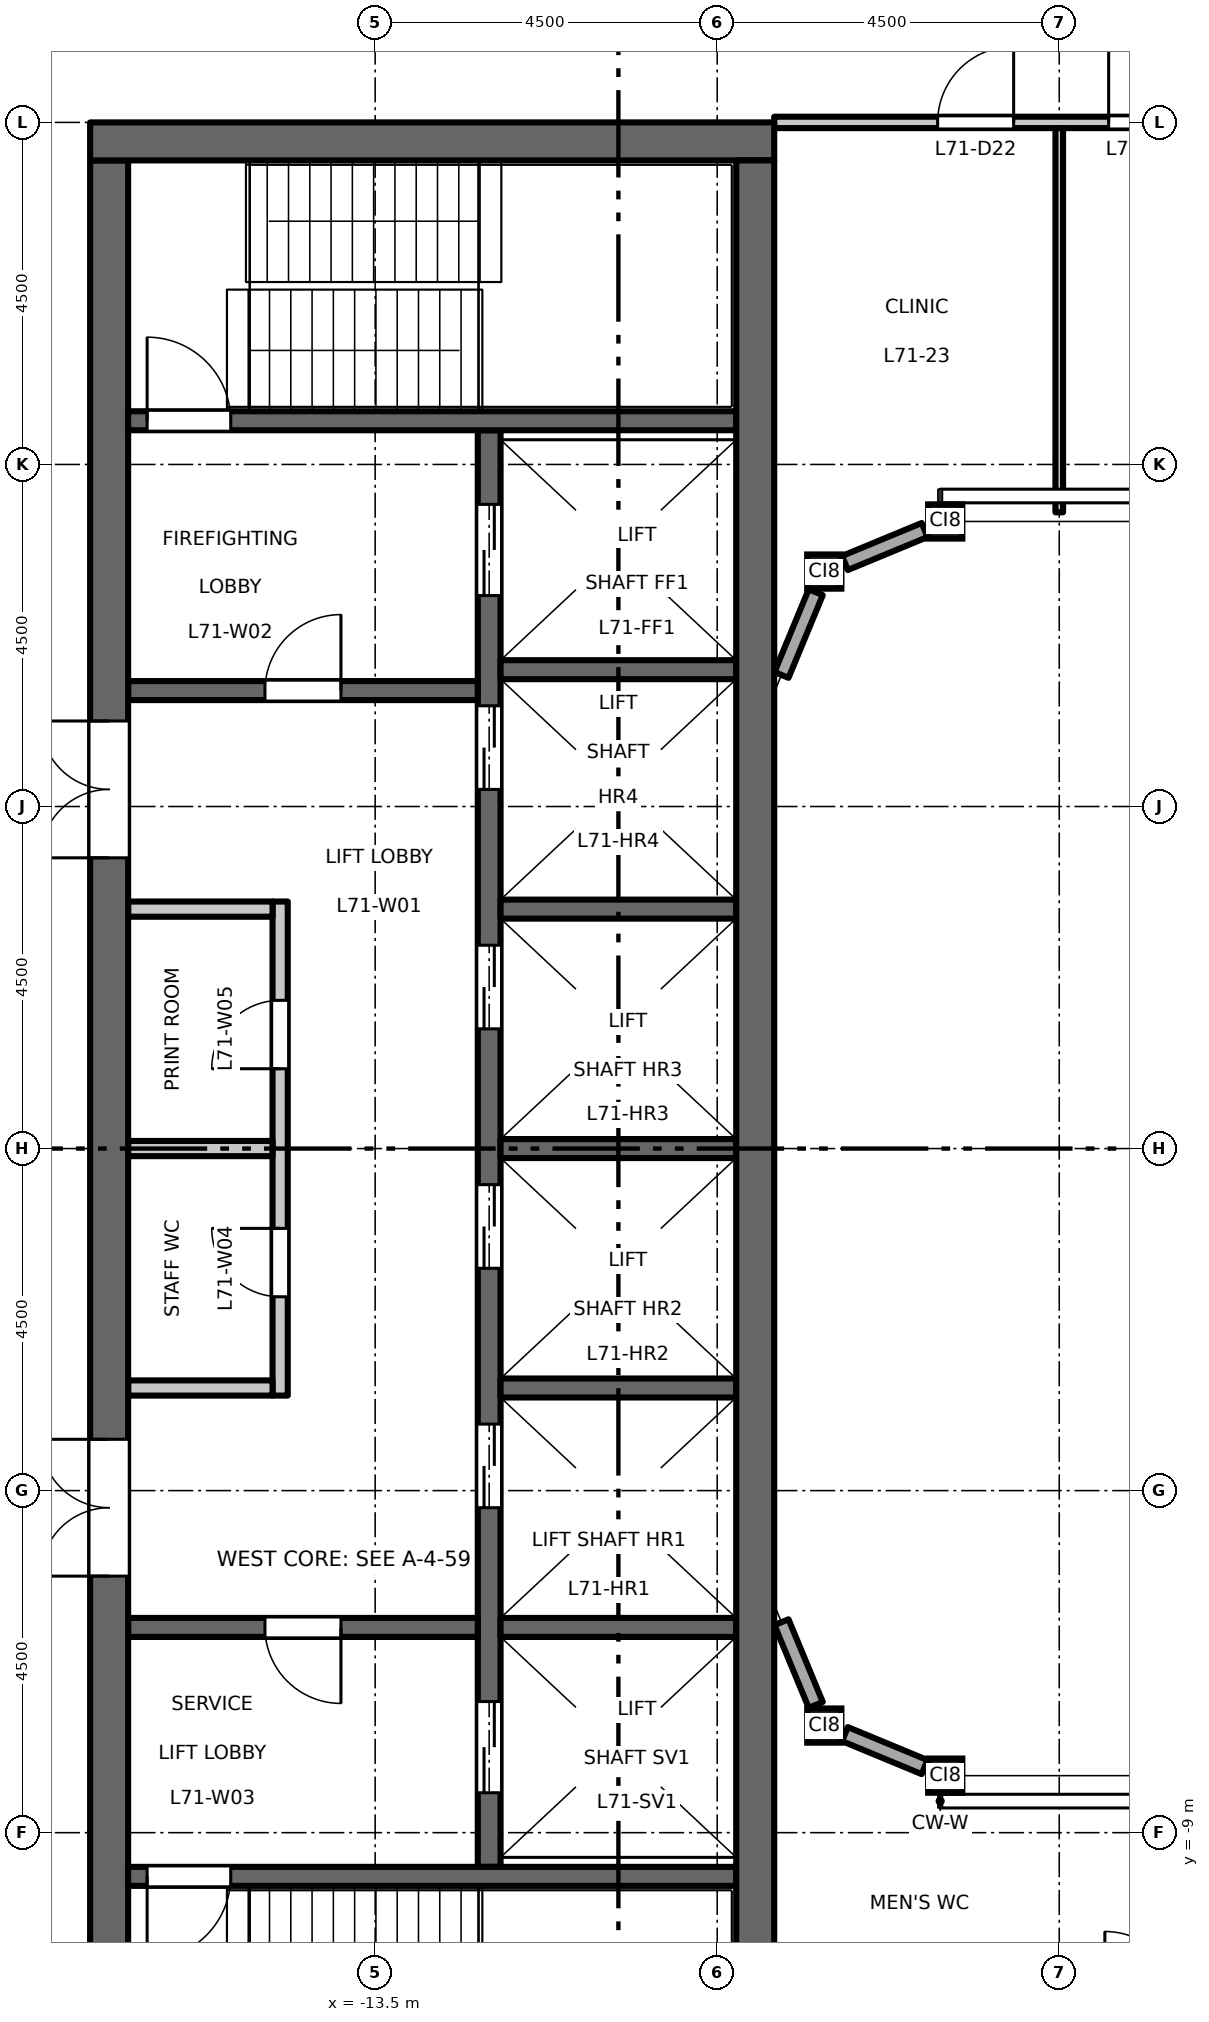
"""IFC4 building model, lengths in metres.
Left out: names, types, materials, properties, quantities, classifications, styles, units other than length and angle.
Written with IfcOpenShell. Run it as: python <this file> out.ifc"""

import sys

from ifc_helpers import new_model, si_unit, direction, frame, frame_2d, origin, origin_2d, place, context, subcontext, project, spatial, rectangle, hollow_rectangle, extrude, element, fill, save


model = new_model("IFC4")
c1 = context("Model", 3, precision=1e-05, world=origin(), true_north=direction((0.0, 1.0)))
c2 = subcontext(c1, "Body", "Model", "MODEL_VIEW")
j1 = project(units=[si_unit("LENGTHUNIT", "METRE"), si_unit("PLANEANGLEUNIT", "RADIAN")], contexts=[c1])
p1 = place(None, origin())
s1 = spatial("IfcSite", under=j1, at=p1, CompositionType="ELEMENT")
p2 = place(p1, origin())
s2 = spatial("IfcBuilding", under=s1, at=p2, CompositionType="ELEMENT")
p3 = place(p2, frame((0.0, 0.0, 330.2)))
s3 = spatial("IfcBuildingStorey", under=s2, at=p3, CompositionType="ELEMENT", Elevation=330.2)
for number, where, z_axis, x_axis in (
    (1, (-7.591, -7.591, 0.0), (0.0, 0.0, 1.0), (1.0, 0.0, 0.0)),
    (2, (-6.0, -8.25, 0.0), (0.0, 0.0, 1.0), (1.0, 0.0, 0.0)),
    (3, (-7.591, 7.591, 0.0), (0.0, 0.0, 1.0), (1.0, 0.0, 0.0)),
    (4, (-6.0, 8.25, 0.0), (0.0, 0.0, 1.0), (1.0, 0.0, 0.0)),
):
    element("IfcColumn", number, at=place(p3, frame(where, z_axis=z_axis, x_axis=x_axis)), inside=s3, PredefinedType="COLUMN", context=c2, shape_type="SweptSolid", body=[
        extrude(hollow_rectangle(XDim=0.45, YDim=0.45, WallThickness=0.022, at=origin_2d()), origin(), (0.0, 0.0, 1.0), 4.5),
    ])
p4 = place(p3, frame((-14.75, -3.25, 0.0), z_axis=(0.0, 0.0, 1.0), x_axis=(0.0, 1.0, 0.0)))
e5 = element("IfcWall", 5, at=p4, inside=s3, PredefinedType="PARTITIONING", context=c2, shape_type="SweptSolid", body=[
    extrude(rectangle(XDim=6.5, YDim=0.2, at=frame_2d((3.25, 0.0))), origin(), (0.0, 0.0, 1.0), 4.35),
])
p5 = place(p4, frame((1.3, 0.0, 0.0)))
e6 = element("IfcOpeningElement", 6, at=p5, cuts=e5, PredefinedType="OPENING", context=c2, shape_type="SweptSolid", body=[
    extrude(rectangle(XDim=0.9, YDim=2.1, at=frame_2d((0.45, 1.05))), frame((0.0, 0.11, 0.0), z_axis=(0.0, -1.0, 0.0), x_axis=(1.0, 0.0, 0.0)), (0.0, 0.0, 1.0), 0.22),
])
p6 = place(p4, frame((4.3, 0.0, 0.0)))
e7 = element("IfcOpeningElement", 7, at=p6, cuts=e5, PredefinedType="OPENING", context=c2, shape_type="SweptSolid", body=[
    extrude(rectangle(XDim=0.9, YDim=2.1, at=frame_2d((0.45, 1.05))), frame((0.0, 0.11, 0.0), z_axis=(0.0, -1.0, 0.0), x_axis=(1.0, 0.0, 0.0)), (0.0, 0.0, 1.0), 0.22),
])
for number, where, z_axis, x_axis in (
    (8, (-14.85, 3.15, 0.0), (0.0, 0.0, 1.0), (-1.0, 0.0, 0.0)),
    (9, (-14.85, -3.15, 0.0), (0.0, 0.0, 1.0), (-1.0, 0.0, 0.0)),
    (10, (-14.85, 0.0, 0.0), (0.0, 0.0, 1.0), (-1.0, 0.0, 0.0)),
):
    element("IfcWall", number, at=place(p3, frame(where, z_axis=z_axis, x_axis=x_axis)), inside=s3, PredefinedType="PARTITIONING", context=c2, shape_type="SweptSolid", body=[
        extrude(rectangle(XDim=1.9, YDim=0.2, at=frame_2d((0.95, 0.0))), origin(), (0.0, 0.0, 1.0), 4.35),
    ])
p7 = place(p3, frame((-12.0, -9.45, 0.0), z_axis=(0.0, 0.0, 1.0), x_axis=(0.0, 1.0, 0.0)))
e11 = element("IfcWall", 11, at=p7, inside=s3, PredefinedType="SHEAR", context=c2, shape_type="SweptSolid", body=[
    extrude(rectangle(XDim=18.9, YDim=0.3, at=frame_2d((9.45, 0.0))), origin(), (0.0, 0.0, 1.0), 4.35),
])
p8 = place(p7, frame((4.725, 0.0, 0.0)))
e12 = element("IfcOpeningElement", 12, at=p8, cuts=e11, PredefinedType="OPENING", context=c2, shape_type="SweptSolid", body=[
    extrude(rectangle(XDim=1.1, YDim=2.1, at=frame_2d((0.55, 1.05))), frame((0.0, 0.16, 0.0), z_axis=(0.0, -1.0, 0.0), x_axis=(1.0, 0.0, 0.0)), (0.0, 0.0, 1.0), 0.32),
])
p9 = place(p7, frame((7.875, 0.0, 0.0)))
e13 = element("IfcOpeningElement", 13, at=p9, cuts=e11, PredefinedType="OPENING", context=c2, shape_type="SweptSolid", body=[
    extrude(rectangle(XDim=1.1, YDim=2.1, at=frame_2d((0.55, 1.05))), frame((0.0, 0.16, 0.0), z_axis=(0.0, -1.0, 0.0), x_axis=(1.0, 0.0, 0.0)), (0.0, 0.0, 1.0), 0.32),
])
p10 = place(p7, frame((11.025, 0.0, 0.0)))
e14 = element("IfcOpeningElement", 14, at=p10, cuts=e11, PredefinedType="OPENING", context=c2, shape_type="SweptSolid", body=[
    extrude(rectangle(XDim=1.1, YDim=2.1, at=frame_2d((0.55, 1.05))), frame((0.0, 0.16, 0.0), z_axis=(0.0, -1.0, 0.0), x_axis=(1.0, 0.0, 0.0)), (0.0, 0.0, 1.0), 0.32),
])
p11 = place(p7, frame((14.175, 0.0, 0.0)))
e15 = element("IfcOpeningElement", 15, at=p11, cuts=e11, PredefinedType="OPENING", context=c2, shape_type="SweptSolid", body=[
    extrude(rectangle(XDim=1.1, YDim=2.1, at=frame_2d((0.55, 1.05))), frame((0.0, 0.16, 0.0), z_axis=(0.0, -1.0, 0.0), x_axis=(1.0, 0.0, 0.0)), (0.0, 0.0, 1.0), 0.32),
])
p12 = place(p7, frame((16.725, 0.0, 0.0)))
e16 = element("IfcOpeningElement", 16, at=p12, cuts=e11, PredefinedType="OPENING", context=c2, shape_type="SweptSolid", body=[
    extrude(rectangle(XDim=1.2, YDim=2.1, at=frame_2d((0.6, 1.05))), frame((0.0, 0.16, 0.0), z_axis=(0.0, -1.0, 0.0), x_axis=(1.0, 0.0, 0.0)), (0.0, 0.0, 1.0), 0.32),
])
p13 = place(p7, frame((0.975, 0.0, 0.0)))
e17 = element("IfcOpeningElement", 17, at=p13, cuts=e11, PredefinedType="OPENING", context=c2, shape_type="SweptSolid", body=[
    extrude(rectangle(XDim=1.2, YDim=2.1, at=frame_2d((0.6, 1.05))), frame((0.0, 0.16, 0.0), z_axis=(0.0, -1.0, 0.0), x_axis=(1.0, 0.0, 0.0)), (0.0, 0.0, 1.0), 0.32),
])
p14 = place(p3, frame((-12.15, 6.025, 0.0), z_axis=(0.0, 0.0, 1.0), x_axis=(-1.0, 0.0, 0.0)))
e18 = element("IfcWall", 18, at=p14, inside=s3, PredefinedType="SHEAR", context=c2, shape_type="SweptSolid", body=[
    extrude(rectangle(XDim=4.6, YDim=0.25, at=frame_2d((2.3, 0.0))), origin(), (0.0, 0.0, 1.0), 4.35),
])
p15 = place(p14, frame((1.8, 0.0, 0.0)))
e19 = element("IfcOpeningElement", 19, at=p15, cuts=e18, PredefinedType="OPENING", context=c2, shape_type="SweptSolid", body=[
    extrude(rectangle(XDim=1.0, YDim=2.1, at=frame_2d((0.5, 1.05))), frame((0.0, 0.135, 0.0), z_axis=(0.0, -1.0, 0.0), x_axis=(1.0, 0.0, 0.0)), (0.0, 0.0, 1.0), 0.27),
])
p16 = place(p3, frame((-12.15, -6.3, 0.0), z_axis=(0.0, 0.0, 1.0), x_axis=(-1.0, 0.0, 0.0)))
e20 = element("IfcWall", 20, at=p16, inside=s3, PredefinedType="SHEAR", context=c2, shape_type="SweptSolid", body=[
    extrude(rectangle(XDim=4.6, YDim=0.25, at=frame_2d((2.3, 0.0))), origin(), (0.0, 0.0, 1.0), 4.35),
])
p17 = place(p16, frame((1.8, 0.0, 0.0)))
e21 = element("IfcOpeningElement", 21, at=p17, cuts=e20, PredefinedType="OPENING", context=c2, shape_type="SweptSolid", body=[
    extrude(rectangle(XDim=1.0, YDim=2.1, at=frame_2d((0.5, 1.05))), frame((0.0, 0.135, 0.0), z_axis=(0.0, -1.0, 0.0), x_axis=(1.0, 0.0, 0.0)), (0.0, 0.0, 1.0), 0.27),
])
p18 = place(p3, frame((-17.0, -13.0, 0.0), z_axis=(0.0, 0.0, 1.0), x_axis=(0.0, 1.0, 0.0)))
e22 = element("IfcWall", 22, at=p18, inside=s3, PredefinedType="SHEAR", context=c2, shape_type="SweptSolid", body=[
    extrude(rectangle(XDim=26.0, YDim=0.5, at=frame_2d((13.0, 0.0))), origin(), (0.0, 0.0, 1.0), 4.35),
])
p19 = place(p18, frame((16.825, 0.0, 0.0)))
e23 = element("IfcOpeningElement", 23, at=p19, cuts=e22, PredefinedType="OPENING", context=c2, shape_type="SweptSolid", body=[
    extrude(rectangle(XDim=1.8, YDim=2.1, at=frame_2d((0.9, 1.05))), frame((0.0, 0.26, 0.0), z_axis=(0.0, -1.0, 0.0), x_axis=(1.0, 0.0, 0.0)), (0.0, 0.0, 1.0), 0.52),
])
p20 = place(p18, frame((7.375, 0.0, 0.0)))
e24 = element("IfcOpeningElement", 24, at=p20, cuts=e22, PredefinedType="OPENING", context=c2, shape_type="SweptSolid", body=[
    extrude(rectangle(XDim=1.8, YDim=2.1, at=frame_2d((0.9, 1.05))), frame((0.0, 0.26, 0.0), z_axis=(0.0, -1.0, 0.0), x_axis=(1.0, 0.0, 0.0)), (0.0, 0.0, 1.0), 0.52),
])
for number, where, z_axis, x_axis in (
    (25, (-8.75, 0.0, 0.0), (0.0, 0.0, 1.0), (-1.0, 0.0, 0.0)),
    (26, (-8.75, 3.15, 0.0), (0.0, 0.0, 1.0), (-1.0, 0.0, 0.0)),
    (27, (-8.75, 6.3, 0.0), (0.0, 0.0, 1.0), (-1.0, 0.0, 0.0)),
    (28, (-8.75, -3.15, 0.0), (0.0, 0.0, 1.0), (-1.0, 0.0, 0.0)),
    (29, (-8.75, -6.3, 0.0), (0.0, 0.0, 1.0), (-1.0, 0.0, 0.0)),
):
    element("IfcWall", number, at=place(p3, frame(where, z_axis=z_axis, x_axis=x_axis)), inside=s3, PredefinedType="SHEAR", context=c2, shape_type="SweptSolid", body=[
        extrude(rectangle(XDim=3.1, YDim=0.25, at=frame_2d((1.55, 0.0))), origin(), (0.0, 0.0, 1.0), 4.35),
    ])
p21 = place(p3, frame((-8.75, 9.575, 0.0), z_axis=(0.0, 0.0, 1.0), x_axis=(-1.0, 0.0, 0.0)))
e30 = element("IfcWall", 30, at=p21, inside=s3, PredefinedType="SHEAR", context=c2, shape_type="SweptSolid", body=[
    extrude(rectangle(XDim=8.0, YDim=0.25, at=frame_2d((4.0, 0.0))), origin(), (0.0, 0.0, 1.0), 4.35),
])
p22 = place(p21, frame((6.65, 0.0, 0.0)))
e31 = element("IfcOpeningElement", 31, at=p22, cuts=e30, PredefinedType="OPENING", context=c2, shape_type="SweptSolid", body=[
    extrude(rectangle(XDim=1.1, YDim=2.1, at=frame_2d((0.55, 1.05))), frame((0.0, 0.135, 0.0), z_axis=(0.0, -1.0, 0.0), x_axis=(1.0, 0.0, 0.0)), (0.0, 0.0, 1.0), 0.27),
])
p23 = place(p3, frame((-8.75, -9.575, 0.0), z_axis=(0.0, 0.0, 1.0), x_axis=(-1.0, 0.0, 0.0)))
e32 = element("IfcWall", 32, at=p23, inside=s3, PredefinedType="SHEAR", context=c2, shape_type="SweptSolid", body=[
    extrude(rectangle(XDim=8.0, YDim=0.25, at=frame_2d((4.0, 0.0))), origin(), (0.0, 0.0, 1.0), 4.35),
])
p24 = place(p23, frame((6.65, 0.0, 0.0)))
e33 = element("IfcOpeningElement", 33, at=p24, cuts=e32, PredefinedType="OPENING", context=c2, shape_type="SweptSolid", body=[
    extrude(rectangle(XDim=1.1, YDim=2.1, at=frame_2d((0.55, 1.05))), frame((0.0, 0.135, 0.0), z_axis=(0.0, -1.0, 0.0), x_axis=(1.0, 0.0, 0.0)), (0.0, 0.0, 1.0), 0.27),
])
p25 = place(p3, frame((-8.25, 13.25, 0.0), z_axis=(0.0, 0.0, 1.0), x_axis=(-1.0, 0.0, 0.0)))
e34 = element("IfcWall", 34, at=p25, inside=s3, PredefinedType="SHEAR", context=c2, shape_type="SweptSolid", body=[
    extrude(rectangle(XDim=9.0, YDim=0.5, at=frame_2d((4.5, 0.0))), origin(), (0.0, 0.0, 1.0), 4.35),
])
p26 = place(p3, frame((-8.5, -13.0, 0.0), z_axis=(0.0, 0.0, 1.0), x_axis=(0.0, 1.0, 0.0)))
e35 = element("IfcWall", 35, at=p26, inside=s3, PredefinedType="SHEAR", context=c2, shape_type="SweptSolid", body=[
    extrude(rectangle(XDim=26.0, YDim=0.5, at=frame_2d((13.0, 0.0))), origin(), (0.0, 0.0, 1.0), 4.35),
])
p27 = place(p3, frame((-6.271, 8.137, 0.0), z_axis=(0.0, 0.0, 1.0), x_axis=(-0.923864661962, -0.382719331074, 0.0)))
e36 = element("IfcWall", 36, at=p27, inside=s3, PredefinedType="STANDARD", context=c2, shape_type="SweptSolid", body=[
    extrude(rectangle(XDim=1.134, YDim=0.2, at=frame_2d((0.567, 0.0))), origin(), (0.0, 0.0, 1.0), 4.01),
])
for number, where, z_axis, x_axis in (
    (37, (-7.703, 7.319, 0.0), (0.0, 0.0, 1.0), (-0.383, -0.924, 0.0)),
    (38, (-8.154, -6.231, 0.0), (0.0, 0.0, 1.0), (0.383, -0.924, 0.0)),
):
    element("IfcWall", number, at=place(p3, frame(where, z_axis=z_axis, x_axis=x_axis)), inside=s3, PredefinedType="STANDARD", context=c2, shape_type="SweptSolid", body=[
        extrude(rectangle(XDim=1.178, YDim=0.2, at=frame_2d((0.589, 0.0))), origin(), (0.0, 0.0, 1.0), 4.01),
    ])
p28 = place(p3, frame((-7.319, -7.703, 0.0), z_axis=(0.0, 0.0, 1.0), x_axis=(0.923864661962, -0.382719331074, 0.0)))
e39 = element("IfcWall", 39, at=p28, inside=s3, PredefinedType="STANDARD", context=c2, shape_type="SweptSolid", body=[
    extrude(rectangle(XDim=1.134, YDim=0.2, at=frame_2d((0.567, 0.0))), origin(), (0.0, 0.0, 1.0), 4.01),
])
p29 = place(p3, frame((-8.25, 13.5, 0.0), z_axis=(0.0, 0.0, 1.0), x_axis=(1.0, 0.0, 0.0)))
e40 = element("IfcWall", 40, at=p29, inside=s3, PredefinedType="PARTITIONING", context=c2, shape_type="SweptSolid", body=[
    extrude(rectangle(XDim=16.5, YDim=0.15, at=frame_2d((8.25, 0.0))), origin(), (0.0, 0.0, 1.0), 4.35),
])
p30 = place(p29, frame((2.15, 0.0, 0.0)))
e41 = element("IfcOpeningElement", 41, at=p30, cuts=e40, PredefinedType="OPENING", context=c2, shape_type="SweptSolid", body=[
    extrude(rectangle(XDim=1.0, YDim=2.1, at=frame_2d((0.5, 1.05))), frame((0.0, 0.085, 0.0), z_axis=(0.0, -1.0, 0.0), x_axis=(1.0, 0.0, 0.0)), (0.0, 0.0, 1.0), 0.17),
])
p31 = place(p29, frame((4.4, 0.0, 0.0)))
e42 = element("IfcOpeningElement", 42, at=p31, cuts=e40, PredefinedType="OPENING", context=c2, shape_type="SweptSolid", body=[
    extrude(rectangle(XDim=1.0, YDim=2.1, at=frame_2d((0.5, 1.05))), frame((0.0, 0.085, 0.0), z_axis=(0.0, -1.0, 0.0), x_axis=(1.0, 0.0, 0.0)), (0.0, 0.0, 1.0), 0.17),
])
p32 = place(p3, frame((-4.5, 8.37, 0.0), z_axis=(0.0, 0.0, 1.0), x_axis=(0.0, 1.0, 0.0)))
e43 = element("IfcWall", 43, at=p32, inside=s3, PredefinedType="PARTITIONING", context=c2, shape_type="SweptSolid", body=[
    extrude(rectangle(XDim=5.055, YDim=0.1, at=frame_2d((2.527, 0.0))), origin(), (0.0, 0.0, 1.0), 3.65),
])
p33 = place(p15, origin())
e44 = element("IfcDoor", 44, at=p33, inside=s3, OperationType="SINGLE_SWING_LEFT", PredefinedType="DOOR", context=c2, shape_type="SweptSolid", body=[
    extrude(rectangle(XDim=1.0, YDim=2.1, at=frame_2d((0.5, 1.05))), frame((0.0, 0.025, 0.0), z_axis=(0.0, -1.0, 0.0), x_axis=(1.0, 0.0, 0.0)), (0.0, 0.0, 1.0), 0.05),
])
fill(e19, e44)
p34 = place(p17, origin())
e45 = element("IfcDoor", 45, at=p34, inside=s3, OperationType="SINGLE_SWING_RIGHT", PredefinedType="DOOR", context=c2, shape_type="SweptSolid", body=[
    extrude(rectangle(XDim=1.0, YDim=2.1, at=frame_2d((0.5, 1.05))), frame((0.0, 0.025, 0.0), z_axis=(0.0, -1.0, 0.0), x_axis=(1.0, 0.0, 0.0)), (0.0, 0.0, 1.0), 0.05),
])
fill(e21, e45)
p35 = place(p22, origin())
e46 = element("IfcDoor", 46, at=p35, inside=s3, OperationType="SINGLE_SWING_RIGHT", PredefinedType="DOOR", context=c2, shape_type="SweptSolid", body=[
    extrude(rectangle(XDim=1.1, YDim=2.1, at=frame_2d((0.55, 1.05))), frame((0.0, 0.025, 0.0), z_axis=(0.0, -1.0, 0.0), x_axis=(1.0, 0.0, 0.0)), (0.0, 0.0, 1.0), 0.05),
])
fill(e31, e46)
p36 = place(p24, origin())
e47 = element("IfcDoor", 47, at=p36, inside=s3, OperationType="SINGLE_SWING_LEFT", PredefinedType="DOOR", context=c2, shape_type="SweptSolid", body=[
    extrude(rectangle(XDim=1.1, YDim=2.1, at=frame_2d((0.55, 1.05))), frame((0.0, 0.025, 0.0), z_axis=(0.0, -1.0, 0.0), x_axis=(1.0, 0.0, 0.0)), (0.0, 0.0, 1.0), 0.05),
])
fill(e33, e47)
p37 = place(p19, origin())
e48 = element("IfcDoor", 48, at=p37, inside=s3, OperationType="DOUBLE_DOOR_DOUBLE_SWING", PredefinedType="DOOR", context=c2, shape_type="SweptSolid", body=[
    extrude(rectangle(XDim=1.8, YDim=2.1, at=frame_2d((0.9, 1.05))), frame((0.0, 0.025, 0.0), z_axis=(0.0, -1.0, 0.0), x_axis=(1.0, 0.0, 0.0)), (0.0, 0.0, 1.0), 0.05),
])
fill(e23, e48)
p38 = place(p20, origin())
e49 = element("IfcDoor", 49, at=p38, inside=s3, OperationType="DOUBLE_DOOR_DOUBLE_SWING", PredefinedType="DOOR", context=c2, shape_type="SweptSolid", body=[
    extrude(rectangle(XDim=1.8, YDim=2.1, at=frame_2d((0.9, 1.05))), frame((0.0, 0.025, 0.0), z_axis=(0.0, -1.0, 0.0), x_axis=(1.0, 0.0, 0.0)), (0.0, 0.0, 1.0), 0.05),
])
fill(e24, e49)
p39 = place(p8, origin())
e50 = element("IfcDoor", 50, at=p39, inside=s3, OperationType="DOUBLE_DOOR_SLIDING", PredefinedType="DOOR", context=c2, shape_type="SweptSolid", body=[
    extrude(rectangle(XDim=1.1, YDim=2.1, at=frame_2d((0.55, 1.05))), frame((0.0, 0.025, 0.0), z_axis=(0.0, -1.0, 0.0), x_axis=(1.0, 0.0, 0.0)), (0.0, 0.0, 1.0), 0.05),
])
fill(e12, e50)
p40 = place(p9, origin())
e51 = element("IfcDoor", 51, at=p40, inside=s3, OperationType="DOUBLE_DOOR_SLIDING", PredefinedType="DOOR", context=c2, shape_type="SweptSolid", body=[
    extrude(rectangle(XDim=1.1, YDim=2.1, at=frame_2d((0.55, 1.05))), frame((0.0, 0.025, 0.0), z_axis=(0.0, -1.0, 0.0), x_axis=(1.0, 0.0, 0.0)), (0.0, 0.0, 1.0), 0.05),
])
fill(e13, e51)
p41 = place(p10, origin())
e52 = element("IfcDoor", 52, at=p41, inside=s3, OperationType="DOUBLE_DOOR_SLIDING", PredefinedType="DOOR", context=c2, shape_type="SweptSolid", body=[
    extrude(rectangle(XDim=1.1, YDim=2.1, at=frame_2d((0.55, 1.05))), frame((0.0, 0.025, 0.0), z_axis=(0.0, -1.0, 0.0), x_axis=(1.0, 0.0, 0.0)), (0.0, 0.0, 1.0), 0.05),
])
fill(e14, e52)
p42 = place(p11, origin())
e53 = element("IfcDoor", 53, at=p42, inside=s3, OperationType="DOUBLE_DOOR_SLIDING", PredefinedType="DOOR", context=c2, shape_type="SweptSolid", body=[
    extrude(rectangle(XDim=1.1, YDim=2.1, at=frame_2d((0.55, 1.05))), frame((0.0, 0.025, 0.0), z_axis=(0.0, -1.0, 0.0), x_axis=(1.0, 0.0, 0.0)), (0.0, 0.0, 1.0), 0.05),
])
fill(e15, e53)
p43 = place(p12, origin())
e54 = element("IfcDoor", 54, at=p43, inside=s3, OperationType="DOUBLE_DOOR_SLIDING", PredefinedType="DOOR", context=c2, shape_type="SweptSolid", body=[
    extrude(rectangle(XDim=1.2, YDim=2.1, at=frame_2d((0.6, 1.05))), frame((0.0, 0.025, 0.0), z_axis=(0.0, -1.0, 0.0), x_axis=(1.0, 0.0, 0.0)), (0.0, 0.0, 1.0), 0.05),
])
fill(e16, e54)
p44 = place(p13, origin())
e55 = element("IfcDoor", 55, at=p44, inside=s3, OperationType="DOUBLE_DOOR_SLIDING", PredefinedType="DOOR", context=c2, shape_type="SweptSolid", body=[
    extrude(rectangle(XDim=1.2, YDim=2.1, at=frame_2d((0.6, 1.05))), frame((0.0, 0.025, 0.0), z_axis=(0.0, -1.0, 0.0), x_axis=(1.0, 0.0, 0.0)), (0.0, 0.0, 1.0), 0.05),
])
fill(e17, e55)
p45 = place(p5, origin())
e56 = element("IfcDoor", 56, at=p45, inside=s3, OperationType="SINGLE_SWING_LEFT", PredefinedType="DOOR", context=c2, shape_type="SweptSolid", body=[
    extrude(rectangle(XDim=0.9, YDim=2.1, at=frame_2d((0.45, 1.05))), frame((0.0, 0.025, 0.0), z_axis=(0.0, -1.0, 0.0), x_axis=(1.0, 0.0, 0.0)), (0.0, 0.0, 1.0), 0.05),
])
fill(e6, e56)
p46 = place(p6, origin())
e57 = element("IfcDoor", 57, at=p46, inside=s3, OperationType="SINGLE_SWING_RIGHT", PredefinedType="DOOR", context=c2, shape_type="SweptSolid", body=[
    extrude(rectangle(XDim=0.9, YDim=2.1, at=frame_2d((0.45, 1.05))), frame((0.0, 0.025, 0.0), z_axis=(0.0, -1.0, 0.0), x_axis=(1.0, 0.0, 0.0)), (0.0, 0.0, 1.0), 0.05),
])
fill(e7, e57)
p47 = place(p30, origin())
e58 = element("IfcDoor", 58, at=p47, inside=s3, OperationType="SINGLE_SWING_RIGHT", PredefinedType="DOOR", context=c2, shape_type="SweptSolid", body=[
    extrude(rectangle(XDim=1.0, YDim=2.1, at=frame_2d((0.5, 1.05))), frame((0.0, 0.025, 0.0), z_axis=(0.0, -1.0, 0.0), x_axis=(1.0, 0.0, 0.0)), (0.0, 0.0, 1.0), 0.05),
])
fill(e41, e58)
p48 = place(p31, origin())
e59 = element("IfcDoor", 59, at=p48, inside=s3, OperationType="SINGLE_SWING_LEFT", PredefinedType="DOOR", context=c2, shape_type="SweptSolid", body=[
    extrude(rectangle(XDim=1.0, YDim=2.1, at=frame_2d((0.5, 1.05))), frame((0.0, 0.025, 0.0), z_axis=(0.0, -1.0, 0.0), x_axis=(1.0, 0.0, 0.0)), (0.0, 0.0, 1.0), 0.05),
])
fill(e42, e59)
save(model, sys.argv[1])
